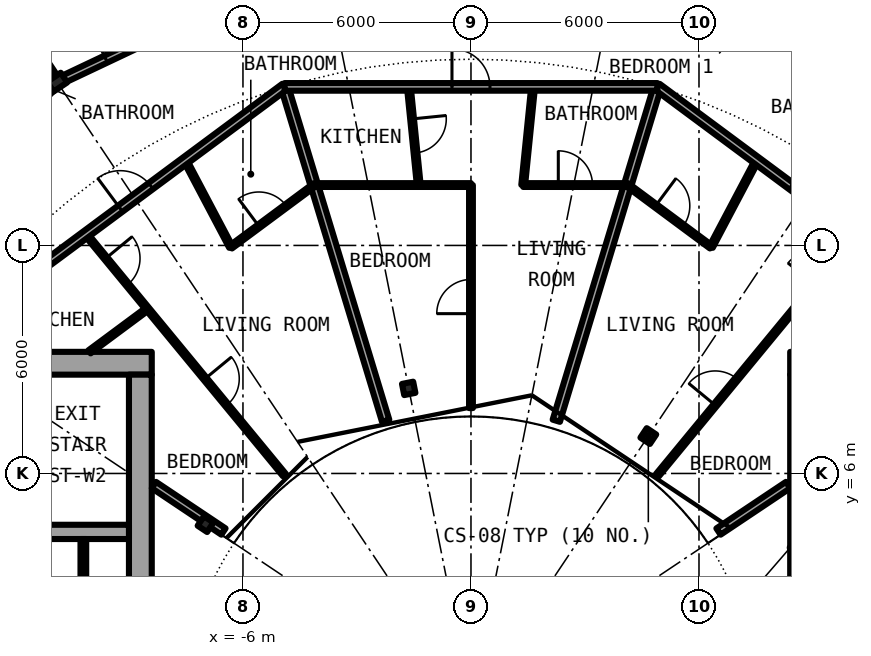
"""IFC4 building model, lengths in metres.
Left out: names, types, materials, properties, quantities, classifications, styles, units other than length and angle.
Written with IfcOpenShell. Run it as: python <this file> out.ifc"""

import sys

from ifc_helpers import new_model, si_unit, direction, frame, frame_2d, origin, origin_2d, place, context, subcontext, project, spatial, rectangle, i_section, extrude, element, fill, save


model = new_model("IFC4")
c1 = context("Model", 3, precision=1e-05, world=origin(), true_north=direction((0.0, 1.0)))
c2 = subcontext(c1, "Body", "Model", "MODEL_VIEW")
j1 = project(units=[si_unit("LENGTHUNIT", "METRE"), si_unit("PLANEANGLEUNIT", "RADIAN")], contexts=[c1])
p1 = place(None, origin())
s1 = spatial("IfcSite", under=j1, at=p1, CompositionType="ELEMENT")
p2 = place(p1, origin())
s2 = spatial("IfcBuilding", under=s1, at=p2, CompositionType="ELEMENT")
p3 = place(p2, frame((0.0, 0.0, 117.75)))
s3 = spatial("IfcBuildingStorey", under=s2, at=p3, CompositionType="ELEMENT", Elevation=117.75)
p4 = place(p3, frame((-10.889, 16.297, 0.0), z_axis=(0.0, 0.0, 1.0), x_axis=(-0.55557023302, 0.831469612303, 0.0)))
e1 = element("IfcColumn", 1, at=p4, inside=s3, PredefinedType="COLUMN", context=c2, shape_type="SweptSolid", body=[
    extrude(i_section(OverallWidth=0.307, OverallDepth=0.432, WebThickness=0.021, FlangeThickness=0.04, FilletRadius=0.027, at=origin_2d()), origin(), (0.0, 0.0, 1.0), 3.05),
])
for number, where, z_axis, x_axis in (
    (2, (4.667, 6.984, 0.0), (0.0, 0.0, 1.0), (0.556, 0.831, 0.0)),
    (3, (-1.639, 8.239, 0.0), (0.0, 0.0, 1.0), (-0.195, 0.981, 0.0)),
    (4, (-6.984, 4.667, 0.0), (0.0, 0.0, 1.0), (-0.831, 0.556, 0.0)),
):
    element("IfcColumn", number, at=place(p3, frame(where, z_axis=z_axis, x_axis=x_axis)), inside=s3, PredefinedType="COLUMN", context=c2, shape_type="SweptSolid", body=[
        extrude(i_section(OverallWidth=0.3, OverallDepth=0.3, WebThickness=0.011, FlangeThickness=0.019, FilletRadius=0.027, at=origin_2d()), origin(), (0.0, 0.0, 1.0), 3.05),
    ])
p5 = place(p3, frame((22.2, 8.9, 0.0), z_axis=(0.0, 0.0, 1.0), x_axis=(-1.0, 0.0, 0.0)))
e5 = element("IfcWall", 5, at=p5, inside=s3, PredefinedType="SHEAR", context=c2, shape_type="SweptSolid", body=[
    extrude(rectangle(XDim=13.8, YDim=0.6, at=frame_2d((6.9, 0.0))), origin(), (0.0, 0.0, 1.0), 3.05),
])
p6 = place(p5, frame((1.125, 0.0, 0.0)))
e6 = element("IfcOpeningElement", 6, at=p6, cuts=e5, PredefinedType="OPENING", context=c2, shape_type="SweptSolid", body=[
    extrude(rectangle(XDim=1.2, YDim=2.3, at=frame_2d((0.6, 1.15))), frame((0.0, 0.31, 0.0), z_axis=(0.0, -1.0, 0.0), x_axis=(1.0, 0.0, 0.0)), (0.0, 0.0, 1.0), 0.62),
])
p7 = place(p3, frame((8.7, -8.6, 0.0), z_axis=(0.0, 0.0, 1.0), x_axis=(0.0, 1.0, 0.0)))
e7 = element("IfcWall", 7, at=p7, inside=s3, PredefinedType="SHEAR", context=c2, shape_type="SweptSolid", body=[
    extrude(rectangle(XDim=17.2, YDim=0.6, at=frame_2d((8.6, 0.0))), origin(), (0.0, 0.0, 1.0), 3.05),
])
p8 = place(p7, frame((7.4, 0.0, 0.1)))
e8 = element("IfcOpeningElement", 8, at=p8, cuts=e7, PredefinedType="OPENING", context=c2, shape_type="SweptSolid", body=[
    extrude(rectangle(XDim=2.4, YDim=2.2, at=frame_2d((1.2, 1.1))), frame((0.0, 0.31, 0.0), z_axis=(0.0, -1.0, 0.0), x_axis=(1.0, 0.0, 0.0)), (0.0, 0.0, 1.0), 0.62),
])
p9 = place(p3, frame((-8.4, 8.9, 0.0), z_axis=(0.0, 0.0, 1.0), x_axis=(-1.0, 0.0, 0.0)))
e9 = element("IfcWall", 9, at=p9, inside=s3, PredefinedType="SHEAR", context=c2, shape_type="SweptSolid", body=[
    extrude(rectangle(XDim=13.8, YDim=0.6, at=frame_2d((6.9, 0.0))), origin(), (0.0, 0.0, 1.0), 3.05),
])
p10 = place(p9, frame((11.475, 0.0, 0.0)))
e10 = element("IfcOpeningElement", 10, at=p10, cuts=e9, PredefinedType="OPENING", context=c2, shape_type="SweptSolid", body=[
    extrude(rectangle(XDim=1.2, YDim=2.3, at=frame_2d((0.6, 1.15))), frame((0.0, 0.31, 0.0), z_axis=(0.0, -1.0, 0.0), x_axis=(1.0, 0.0, 0.0)), (0.0, 0.0, 1.0), 0.62),
])
p11 = place(p3, frame((-8.7, 8.6, 0.0), z_axis=(0.0, 0.0, 1.0), x_axis=(0.0, -1.0, 0.0)))
e11 = element("IfcWall", 11, at=p11, inside=s3, PredefinedType="SHEAR", context=c2, shape_type="SweptSolid", body=[
    extrude(rectangle(XDim=17.2, YDim=0.6, at=frame_2d((8.6, 0.0))), origin(), (0.0, 0.0, 1.0), 3.05),
])
p12 = place(p11, frame((7.4, 0.0, 0.1)))
e12 = element("IfcOpeningElement", 12, at=p12, cuts=e11, PredefinedType="OPENING", context=c2, shape_type="SweptSolid", body=[
    extrude(rectangle(XDim=2.4, YDim=2.2, at=frame_2d((1.2, 1.1))), frame((0.0, 0.31, 0.0), z_axis=(0.0, -1.0, 0.0), x_axis=(1.0, 0.0, 0.0)), (0.0, 0.0, 1.0), 0.62),
])
p13 = place(p3, frame((-9.0, 4.462, 0.0), z_axis=(0.0, 0.0, 1.0), x_axis=(-1.0, 0.0, 0.0)))
e13 = element("IfcWall", 13, at=p13, inside=s3, PredefinedType="SHEAR", context=c2, shape_type="SweptSolid", body=[
    extrude(rectangle(XDim=10.15, YDim=0.375, at=frame_2d((5.075, 0.0))), origin(), (0.0, 0.0, 1.0), 3.05),
])
p14 = place(p3, frame((-10.2, 1.825, 0.0), z_axis=(0.0, 0.0, 1.0), x_axis=(0.0, 1.0, 0.0)))
e14 = element("IfcWall", 14, at=p14, inside=s3, PredefinedType="PARTITIONING", context=c2, shape_type="SweptSolid", body=[
    extrude(rectangle(XDim=2.45, YDim=0.15, at=frame_2d((1.225, 0.0))), origin(), (0.0, 0.0, 1.0), 2.7),
])
for number, where, z_axis, x_axis in (
    (15, (-4.907, 16.172, 0.0), (0.0, 0.0, 1.0), (0.29, -0.957, 0.0)),
    (16, (2.245, 7.387, 0.0), (0.0, 0.0, 1.0), (0.29, 0.957, 0.0)),
):
    element("IfcWall", number, at=place(p3, frame(where, z_axis=z_axis, x_axis=x_axis)), inside=s3, PredefinedType="PARTITIONING", context=c2, shape_type="SweptSolid", body=[
        extrude(rectangle(XDim=9.18, YDim=0.2, at=frame_2d((4.59, 0.0))), origin(), (0.0, 0.0, 1.0), 2.7),
    ])
p15 = place(p3, frame((-15.097, 22.595, 0.0), z_axis=(0.0, 0.0, 1.0), x_axis=(0.555572791, -0.831467903109, 0.0)))
e17 = element("IfcWall", 17, at=p15, inside=s3, PredefinedType="PARTITIONING", context=c2, shape_type="SweptSolid", body=[
    extrude(rectangle(XDim=7.358, YDim=0.2, at=frame_2d((3.679, 0.0))), origin(), (0.0, 0.0, 1.0), 2.7),
])
p16 = place(p3, frame((-10.132, 12.296, 0.0), z_axis=(0.0, 0.0, 1.0), x_axis=(0.635976043025, -0.771708800454, 0.0)))
e18 = element("IfcWall", 18, at=p16, inside=s3, PredefinedType="PARTITIONING", context=c2, shape_type="SweptSolid", body=[
    extrude(rectangle(XDim=8.213, YDim=0.1, at=frame_2d((4.106, 0.0))), origin(), (0.0, 0.0, 1.0), 2.7),
])
p17 = place(p16, frame((0.823, 0.0, 0.0)))
e19 = element("IfcOpeningElement", 19, at=p17, cuts=e18, PredefinedType="OPENING", context=c2, shape_type="SweptSolid", body=[
    extrude(rectangle(XDim=0.9, YDim=2.3, at=frame_2d((0.45, 1.15))), frame((0.0, 0.06, 0.0), z_axis=(0.0, -1.0, 0.0), x_axis=(1.0, 0.0, 0.0)), (0.0, 0.0, 1.0), 0.12),
])
p18 = place(p16, frame((4.929, 0.0, 0.0)))
e20 = element("IfcOpeningElement", 20, at=p18, cuts=e18, PredefinedType="OPENING", context=c2, shape_type="SweptSolid", body=[
    extrude(rectangle(XDim=0.9, YDim=2.3, at=frame_2d((0.45, 1.15))), frame((0.0, 0.06, 0.0), z_axis=(0.0, -1.0, 0.0), x_axis=(1.0, 0.0, 0.0)), (0.0, 0.0, 1.0), 0.12),
])
p19 = place(p3, frame((-7.519, 14.234, 0.0), z_axis=(0.0, 0.0, 1.0), x_axis=(0.467001992543, -0.884256263173, 0.0)))
e21 = element("IfcWall", 21, at=p19, inside=s3, PredefinedType="PARTITIONING", context=c2, shape_type="SweptSolid", body=[
    extrude(rectangle(XDim=2.572, YDim=0.1, at=frame_2d((1.286, 0.0))), origin(), (0.0, 0.0, 1.0), 2.7),
])
p20 = place(p3, frame((-1.635, 16.172, 0.0), z_axis=(0.0, 0.0, 1.0), x_axis=(0.100527855112, -0.994934244233, 0.0)))
e22 = element("IfcWall", 22, at=p20, inside=s3, PredefinedType="PARTITIONING", context=c2, shape_type="SweptSolid", body=[
    extrude(rectangle(XDim=2.596, YDim=0.1, at=frame_2d((1.298, 0.0))), origin(), (0.0, 0.0, 1.0), 2.7),
])
p21 = place(p20, frame((0.848, 0.0, 0.0)))
e23 = element("IfcOpeningElement", 23, at=p21, cuts=e22, PredefinedType="OPENING", context=c2, shape_type="SweptSolid", body=[
    extrude(rectangle(XDim=0.9, YDim=2.3, at=frame_2d((0.45, 1.15))), frame((0.0, 0.06, 0.0), z_axis=(0.0, -1.0, 0.0), x_axis=(1.0, 0.0, 0.0)), (0.0, 0.0, 1.0), 0.12),
])
p22 = place(p3, frame((0.0, 7.72, 0.0), z_axis=(0.0, 0.0, 1.0), x_axis=(0.0, 1.0, 0.0)))
e24 = element("IfcWall", 24, at=p22, inside=s3, PredefinedType="PARTITIONING", context=c2, shape_type="SweptSolid", body=[
    extrude(rectangle(XDim=5.869, YDim=0.1, at=frame_2d((2.935, 0.0))), origin(), (0.0, 0.0, 1.0), 2.7),
])
p23 = place(p22, frame((2.485, 0.0, 0.0)))
e25 = element("IfcOpeningElement", 25, at=p23, cuts=e24, PredefinedType="OPENING", context=c2, shape_type="SweptSolid", body=[
    extrude(rectangle(XDim=0.9, YDim=2.3, at=frame_2d((0.45, 1.15))), frame((0.0, 0.06, 0.0), z_axis=(0.0, -1.0, 0.0), x_axis=(1.0, 0.0, 0.0)), (0.0, 0.0, 1.0), 0.12),
])
p24 = place(p3, frame((1.374, 13.589, 0.0), z_axis=(0.0, 0.0, 1.0), x_axis=(0.100527855112, 0.994934244233, 0.0)))
e26 = element("IfcWall", 26, at=p24, inside=s3, PredefinedType="PARTITIONING", context=c2, shape_type="SweptSolid", body=[
    extrude(rectangle(XDim=2.596, YDim=0.1, at=frame_2d((1.298, 0.0))), origin(), (0.0, 0.0, 1.0), 2.7),
])
p25 = place(p3, frame((4.909, 5.958, 0.0), z_axis=(0.0, 0.0, 1.0), x_axis=(0.635976043025, 0.771708800454, 0.0)))
e27 = element("IfcWall", 27, at=p25, inside=s3, PredefinedType="PARTITIONING", context=c2, shape_type="SweptSolid", body=[
    extrude(rectangle(XDim=8.213, YDim=0.1, at=frame_2d((4.106, 0.0))), origin(), (0.0, 0.0, 1.0), 2.7),
])
p26 = place(p25, frame((6.49, 0.0, 0.0)))
e28 = element("IfcOpeningElement", 28, at=p26, cuts=e27, PredefinedType="OPENING", context=c2, shape_type="SweptSolid", body=[
    extrude(rectangle(XDim=0.9, YDim=2.3, at=frame_2d((0.45, 1.15))), frame((0.0, 0.06, 0.0), z_axis=(0.0, -1.0, 0.0), x_axis=(1.0, 0.0, 0.0)), (0.0, 0.0, 1.0), 0.12),
])
p27 = place(p25, frame((2.384, 0.0, 0.0)))
e29 = element("IfcOpeningElement", 29, at=p27, cuts=e27, PredefinedType="OPENING", context=c2, shape_type="SweptSolid", body=[
    extrude(rectangle(XDim=0.9, YDim=2.3, at=frame_2d((0.45, 1.15))), frame((0.0, 0.06, 0.0), z_axis=(0.0, -1.0, 0.0), x_axis=(1.0, 0.0, 0.0)), (0.0, 0.0, 1.0), 0.12),
])
p28 = place(p3, frame((6.318, 11.96, 0.0), z_axis=(0.0, 0.0, 1.0), x_axis=(0.467001992543, 0.884256263173, 0.0)))
e30 = element("IfcWall", 30, at=p28, inside=s3, PredefinedType="PARTITIONING", context=c2, shape_type="SweptSolid", body=[
    extrude(rectangle(XDim=2.572, YDim=0.1, at=frame_2d((1.286, 0.0))), origin(), (0.0, 0.0, 1.0), 2.7),
])
for number, where, z_axis, x_axis in (
    (31, (-6.513, 4.472, 0.0), (0.0, 0.0, 1.0), (-0.831, 0.556, 0.0)),
    (32, (6.513, 4.472, 0.0), (0.0, 0.0, 1.0), (0.831, 0.556, 0.0)),
):
    element("IfcWall", number, at=place(p3, frame(where, z_axis=z_axis, x_axis=x_axis)), inside=s3, PredefinedType="PARTITIONING", context=c2, shape_type="SweptSolid", body=[
        extrude(rectangle(XDim=2.203, YDim=0.2, at=frame_2d((1.101, 0.0))), origin(), (0.0, 0.0, 1.0), 2.7),
    ])
p29 = place(p3, frame((-10.039, 9.2, 0.0), z_axis=(0.0, 0.0, 1.0), x_axis=(0.803149591038, 0.595777420196, 0.0)))
e33 = element("IfcWall", 33, at=p29, inside=s3, PredefinedType="PARTITIONING", context=c2, shape_type="SweptSolid", body=[
    extrude(rectangle(XDim=1.9, YDim=0.1, at=frame_2d((0.95, 0.0))), origin(), (0.0, 0.0, 1.0), 2.7),
])
p30 = place(p3, frame((-6.318, 11.96, 0.0), z_axis=(0.0, 0.0, 1.0), x_axis=(0.803128348509, 0.595806055542, 0.0)))
e34 = element("IfcWall", 34, at=p30, inside=s3, PredefinedType="PARTITIONING", context=c2, shape_type="SweptSolid", body=[
    extrude(rectangle(XDim=2.734, YDim=0.1, at=frame_2d((1.367, 0.0))), origin(), (0.0, 0.0, 1.0), 2.7),
])
p31 = place(p30, frame((0.917, 0.0, 0.0)))
e35 = element("IfcOpeningElement", 35, at=p31, cuts=e34, PredefinedType="OPENING", context=c2, shape_type="SweptSolid", body=[
    extrude(rectangle(XDim=0.9, YDim=2.3, at=frame_2d((0.45, 1.15))), frame((0.0, 0.06, 0.0), z_axis=(0.0, -1.0, 0.0), x_axis=(1.0, 0.0, 0.0)), (0.0, 0.0, 1.0), 0.12),
])
p32 = place(p3, frame((4.122, 13.589, 0.0), z_axis=(0.0, 0.0, 1.0), x_axis=(0.803128348509, -0.595806055542, 0.0)))
e36 = element("IfcWall", 36, at=p32, inside=s3, PredefinedType="PARTITIONING", context=c2, shape_type="SweptSolid", body=[
    extrude(rectangle(XDim=2.734, YDim=0.1, at=frame_2d((1.367, 0.0))), origin(), (0.0, 0.0, 1.0), 2.7),
])
p33 = place(p32, frame((0.917, 0.0, 0.0)))
e37 = element("IfcOpeningElement", 37, at=p33, cuts=e36, PredefinedType="OPENING", context=c2, shape_type="SweptSolid", body=[
    extrude(rectangle(XDim=0.9, YDim=2.3, at=frame_2d((0.45, 1.15))), frame((0.0, 0.06, 0.0), z_axis=(0.0, -1.0, 0.0), x_axis=(1.0, 0.0, 0.0)), (0.0, 0.0, 1.0), 0.12),
])
p34 = place(p3, frame((-4.122, 13.589, 0.0), z_axis=(0.0, 0.0, 1.0), x_axis=(1.0, 0.0, 0.0)))
e38 = element("IfcWall", 38, at=p34, inside=s3, PredefinedType="PARTITIONING", context=c2, shape_type="SweptSolid", body=[
    extrude(rectangle(XDim=4.122, YDim=0.1, at=frame_2d((2.061, 0.0))), origin(), (0.0, 0.0, 1.0), 2.7),
])
p35 = place(p3, frame((1.374, 13.589, 0.0), z_axis=(0.0, 0.0, 1.0), x_axis=(1.0, 0.0, 0.0)))
e39 = element("IfcWall", 39, at=p35, inside=s3, PredefinedType="PARTITIONING", context=c2, shape_type="SweptSolid", body=[
    extrude(rectangle(XDim=2.748, YDim=0.1, at=frame_2d((1.374, 0.0))), origin(), (0.0, 0.0, 1.0), 2.7),
])
p36 = place(p35, frame((0.924, 0.0, 0.0)))
e40 = element("IfcOpeningElement", 40, at=p36, cuts=e39, PredefinedType="OPENING", context=c2, shape_type="SweptSolid", body=[
    extrude(rectangle(XDim=0.9, YDim=2.3, at=frame_2d((0.45, 1.15))), frame((0.0, 0.06, 0.0), z_axis=(0.0, -1.0, 0.0), x_axis=(1.0, 0.0, 0.0)), (0.0, 0.0, 1.0), 0.12),
])
p37 = place(p3, frame((-14.052, 9.389, 0.0), z_axis=(0.0, 0.0, 1.0), x_axis=(0.803204584823, 0.59570327758, 0.0)))
e41 = element("IfcWall", 41, at=p37, inside=s3, PredefinedType="PARTITIONING", context=c2, shape_type="SweptSolid", body=[
    extrude(rectangle(XDim=11.387, YDim=0.2, at=frame_2d((5.693, 0.0))), origin(), (0.0, 0.0, 1.0), 2.7),
])
p38 = place(p37, frame((6.007, 0.0, 0.0)))
e42 = element("IfcOpeningElement", 42, at=p38, cuts=e41, PredefinedType="OPENING", context=c2, shape_type="SweptSolid", body=[
    extrude(rectangle(XDim=1.0, YDim=2.3, at=frame_2d((0.5, 1.15))), frame((0.0, 0.11, 0.0), z_axis=(0.0, -1.0, 0.0), x_axis=(1.0, 0.0, 0.0)), (0.0, 0.0, 1.0), 0.22),
])
p39 = place(p3, frame((4.906, 16.172, 0.0), z_axis=(0.0, 0.0, 1.0), x_axis=(0.803204584823, -0.59570327758, 0.0)))
e43 = element("IfcWall", 43, at=p39, inside=s3, PredefinedType="PARTITIONING", context=c2, shape_type="SweptSolid", body=[
    extrude(rectangle(XDim=11.387, YDim=0.2, at=frame_2d((5.693, 0.0))), origin(), (0.0, 0.0, 1.0), 2.7),
])
p40 = place(p39, frame((4.38, 0.0, 0.0)))
e44 = element("IfcOpeningElement", 44, at=p40, cuts=e43, PredefinedType="OPENING", context=c2, shape_type="SweptSolid", body=[
    extrude(rectangle(XDim=1.0, YDim=2.3, at=frame_2d((0.5, 1.15))), frame((0.0, 0.11, 0.0), z_axis=(0.0, -1.0, 0.0), x_axis=(1.0, 0.0, 0.0)), (0.0, 0.0, 1.0), 0.22),
])
p41 = place(p3, frame((-4.906, 16.172, 0.0), z_axis=(0.0, 0.0, 1.0), x_axis=(1.0, 0.0, 0.0)))
e45 = element("IfcWall", 45, at=p41, inside=s3, PredefinedType="PARTITIONING", context=c2, shape_type="SweptSolid", body=[
    extrude(rectangle(XDim=9.812, YDim=0.2, at=frame_2d((4.906, 0.0))), origin(), (0.0, 0.0, 1.0), 2.7),
])
p42 = place(p41, frame((4.406, 0.0, 0.0)))
e46 = element("IfcOpeningElement", 46, at=p42, cuts=e45, PredefinedType="OPENING", context=c2, shape_type="SweptSolid", body=[
    extrude(rectangle(XDim=1.0, YDim=2.3, at=frame_2d((0.5, 1.15))), frame((0.0, 0.11, 0.0), z_axis=(0.0, -1.0, 0.0), x_axis=(1.0, 0.0, 0.0)), (0.0, 0.0, 1.0), 0.22),
])
p43 = place(p3, frame((-16.186, 11.0, 0.0), z_axis=(0.0, 0.0, 1.0), x_axis=(0.707106781187, 0.707106781187, 0.0)))
e47 = element("IfcWall", 47, at=p43, inside=s3, PredefinedType="PARTITIONING", context=c2, shape_type="SweptSolid", body=[
    extrude(rectangle(XDim=7.334, YDim=0.2, at=frame_2d((3.667, 0.0))), origin(), (0.0, 0.0, 1.0), 2.39),
])
p44 = place(p43, frame((2.211, 0.0, 0.0)))
e48 = element("IfcOpeningElement", 48, at=p44, cuts=e47, PredefinedType="OPENING", context=c2, shape_type="SweptSolid", body=[
    extrude(rectangle(XDim=1.0, YDim=2.3, at=frame_2d((0.5, 1.15))), frame((0.0, 0.11, 0.0), z_axis=(0.0, -1.0, 0.0), x_axis=(1.0, 0.0, 0.0)), (0.0, 0.0, 1.0), 0.22),
])
p45 = place(p3, frame((5.687, 18.757, 0.0), z_axis=(0.0, 0.0, 1.0), x_axis=(0.8819312112, -0.471378127104, 0.0)))
e49 = element("IfcWall", 49, at=p45, inside=s3, PredefinedType="PARTITIONING", context=c2, shape_type="SweptSolid", body=[
    extrude(rectangle(XDim=7.65, YDim=0.2, at=frame_2d((3.825, 0.0))), origin(), (0.0, 0.0, 1.0), 2.39),
])
p46 = place(p45, frame((2.371, 0.0, 0.0)))
e50 = element("IfcOpeningElement", 50, at=p46, cuts=e49, PredefinedType="OPENING", context=c2, shape_type="SweptSolid", body=[
    extrude(rectangle(XDim=1.0, YDim=2.3, at=frame_2d((0.5, 1.15))), frame((0.0, 0.11, 0.0), z_axis=(0.0, -1.0, 0.0), x_axis=(1.0, 0.0, 0.0)), (0.0, 0.0, 1.0), 0.22),
])
p47 = place(p3, frame((-10.748, 16.362, 0.0), z_axis=(0.0, 0.0, 1.0), x_axis=(0.903869270233, 0.427808768409, 0.0)))
e51 = element("IfcWall", 51, at=p47, inside=s3, PredefinedType="PARTITIONING", context=c2, shape_type="SweptSolid", body=[
    extrude(rectangle(XDim=5.596, YDim=0.2, at=frame_2d((2.798, 0.0))), origin(), (0.0, 0.0, 1.0), 2.39),
])
p48 = place(p47, frame((1.262, 0.0, 0.0)))
e52 = element("IfcOpeningElement", 52, at=p48, cuts=e51, PredefinedType="OPENING", context=c2, shape_type="SweptSolid", body=[
    extrude(rectangle(XDim=1.0, YDim=2.3, at=frame_2d((0.5, 1.15))), frame((0.0, 0.11, 0.0), z_axis=(0.0, -1.0, 0.0), x_axis=(1.0, 0.0, 0.0)), (0.0, 0.0, 1.0), 0.22),
])
p49 = place(p48, origin())
e53 = element("IfcDoor", 53, at=p49, inside=s3, OperationType="SINGLE_SWING_LEFT", PredefinedType="DOOR", context=c2, shape_type="SweptSolid", body=[
    extrude(rectangle(XDim=1.0, YDim=2.3, at=frame_2d((0.5, 1.15))), frame((0.0, 0.025, 0.0), z_axis=(0.0, -1.0, 0.0), x_axis=(1.0, 0.0, 0.0)), (0.0, 0.0, 1.0), 0.05),
])
fill(e52, e53)
p50 = place(p40, origin())
e54 = element("IfcDoor", 54, at=p50, inside=s3, OperationType="SINGLE_SWING_LEFT", PredefinedType="DOOR", context=c2, shape_type="SweptSolid", body=[
    extrude(rectangle(XDim=1.0, YDim=2.3, at=frame_2d((0.5, 1.15))), frame((0.0, 0.025, 0.0), z_axis=(0.0, -1.0, 0.0), x_axis=(1.0, 0.0, 0.0)), (0.0, 0.0, 1.0), 0.05),
])
fill(e44, e54)
p51 = place(p33, origin())
e55 = element("IfcDoor", 55, at=p51, inside=s3, OperationType="SINGLE_SWING_LEFT", PredefinedType="DOOR", context=c2, shape_type="SweptSolid", body=[
    extrude(rectangle(XDim=0.9, YDim=2.3, at=frame_2d((0.45, 1.15))), frame((0.0, 0.025, 0.0), z_axis=(0.0, -1.0, 0.0), x_axis=(1.0, 0.0, 0.0)), (0.0, 0.0, 1.0), 0.05),
])
fill(e37, e55)
p52 = place(p27, origin())
e56 = element("IfcDoor", 56, at=p52, inside=s3, OperationType="SINGLE_SWING_LEFT", PredefinedType="DOOR", context=c2, shape_type="SweptSolid", body=[
    extrude(rectangle(XDim=0.9, YDim=2.3, at=frame_2d((0.45, 1.15))), frame((0.0, 0.025, 0.0), z_axis=(0.0, -1.0, 0.0), x_axis=(1.0, 0.0, 0.0)), (0.0, 0.0, 1.0), 0.05),
])
fill(e29, e56)
p53 = place(p42, origin())
e57 = element("IfcDoor", 57, at=p53, inside=s3, OperationType="SINGLE_SWING_LEFT", PredefinedType="DOOR", context=c2, shape_type="SweptSolid", body=[
    extrude(rectangle(XDim=1.0, YDim=2.3, at=frame_2d((0.5, 1.15))), frame((0.0, 0.025, 0.0), z_axis=(0.0, -1.0, 0.0), x_axis=(1.0, 0.0, 0.0)), (0.0, 0.0, 1.0), 0.05),
])
fill(e46, e57)
p54 = place(p36, origin())
e58 = element("IfcDoor", 58, at=p54, inside=s3, OperationType="SINGLE_SWING_RIGHT", PredefinedType="DOOR", context=c2, shape_type="SweptSolid", body=[
    extrude(rectangle(XDim=0.9, YDim=2.3, at=frame_2d((0.45, 1.15))), frame((0.0, 0.025, 0.0), z_axis=(0.0, -1.0, 0.0), x_axis=(1.0, 0.0, 0.0)), (0.0, 0.0, 1.0), 0.05),
])
fill(e40, e58)
p55 = place(p21, origin())
e59 = element("IfcDoor", 59, at=p55, inside=s3, OperationType="SINGLE_SWING_LEFT", PredefinedType="DOOR", context=c2, shape_type="SweptSolid", body=[
    extrude(rectangle(XDim=0.9, YDim=2.3, at=frame_2d((0.45, 1.15))), frame((0.0, 0.025, 0.0), z_axis=(0.0, -1.0, 0.0), x_axis=(1.0, 0.0, 0.0)), (0.0, 0.0, 1.0), 0.05),
])
fill(e23, e59)
p56 = place(p23, origin())
e60 = element("IfcDoor", 60, at=p56, inside=s3, OperationType="SINGLE_SWING_RIGHT", PredefinedType="DOOR", context=c2, shape_type="SweptSolid", body=[
    extrude(rectangle(XDim=0.9, YDim=2.3, at=frame_2d((0.45, 1.15))), frame((0.0, 0.025, 0.0), z_axis=(0.0, -1.0, 0.0), x_axis=(1.0, 0.0, 0.0)), (0.0, 0.0, 1.0), 0.05),
])
fill(e25, e60)
p57 = place(p38, origin())
e61 = element("IfcDoor", 61, at=p57, inside=s3, OperationType="SINGLE_SWING_RIGHT", PredefinedType="DOOR", context=c2, shape_type="SweptSolid", body=[
    extrude(rectangle(XDim=1.0, YDim=2.3, at=frame_2d((0.5, 1.15))), frame((0.0, 0.025, 0.0), z_axis=(0.0, -1.0, 0.0), x_axis=(1.0, 0.0, 0.0)), (0.0, 0.0, 1.0), 0.05),
])
fill(e42, e61)
p58 = place(p31, origin())
e62 = element("IfcDoor", 62, at=p58, inside=s3, OperationType="SINGLE_SWING_RIGHT", PredefinedType="DOOR", context=c2, shape_type="SweptSolid", body=[
    extrude(rectangle(XDim=0.9, YDim=2.3, at=frame_2d((0.45, 1.15))), frame((0.0, 0.025, 0.0), z_axis=(0.0, -1.0, 0.0), x_axis=(1.0, 0.0, 0.0)), (0.0, 0.0, 1.0), 0.05),
])
fill(e35, e62)
p59 = place(p17, origin())
e63 = element("IfcDoor", 63, at=p59, inside=s3, OperationType="SINGLE_SWING_LEFT", PredefinedType="DOOR", context=c2, shape_type="SweptSolid", body=[
    extrude(rectangle(XDim=0.9, YDim=2.3, at=frame_2d((0.45, 1.15))), frame((0.0, 0.025, 0.0), z_axis=(0.0, -1.0, 0.0), x_axis=(1.0, 0.0, 0.0)), (0.0, 0.0, 1.0), 0.05),
])
fill(e19, e63)
p60 = place(p18, origin())
e64 = element("IfcDoor", 64, at=p60, inside=s3, OperationType="SINGLE_SWING_RIGHT", PredefinedType="DOOR", context=c2, shape_type="SweptSolid", body=[
    extrude(rectangle(XDim=0.9, YDim=2.3, at=frame_2d((0.45, 1.15))), frame((0.0, 0.025, 0.0), z_axis=(0.0, -1.0, 0.0), x_axis=(1.0, 0.0, 0.0)), (0.0, 0.0, 1.0), 0.05),
])
fill(e20, e64)
save(model, sys.argv[1])
